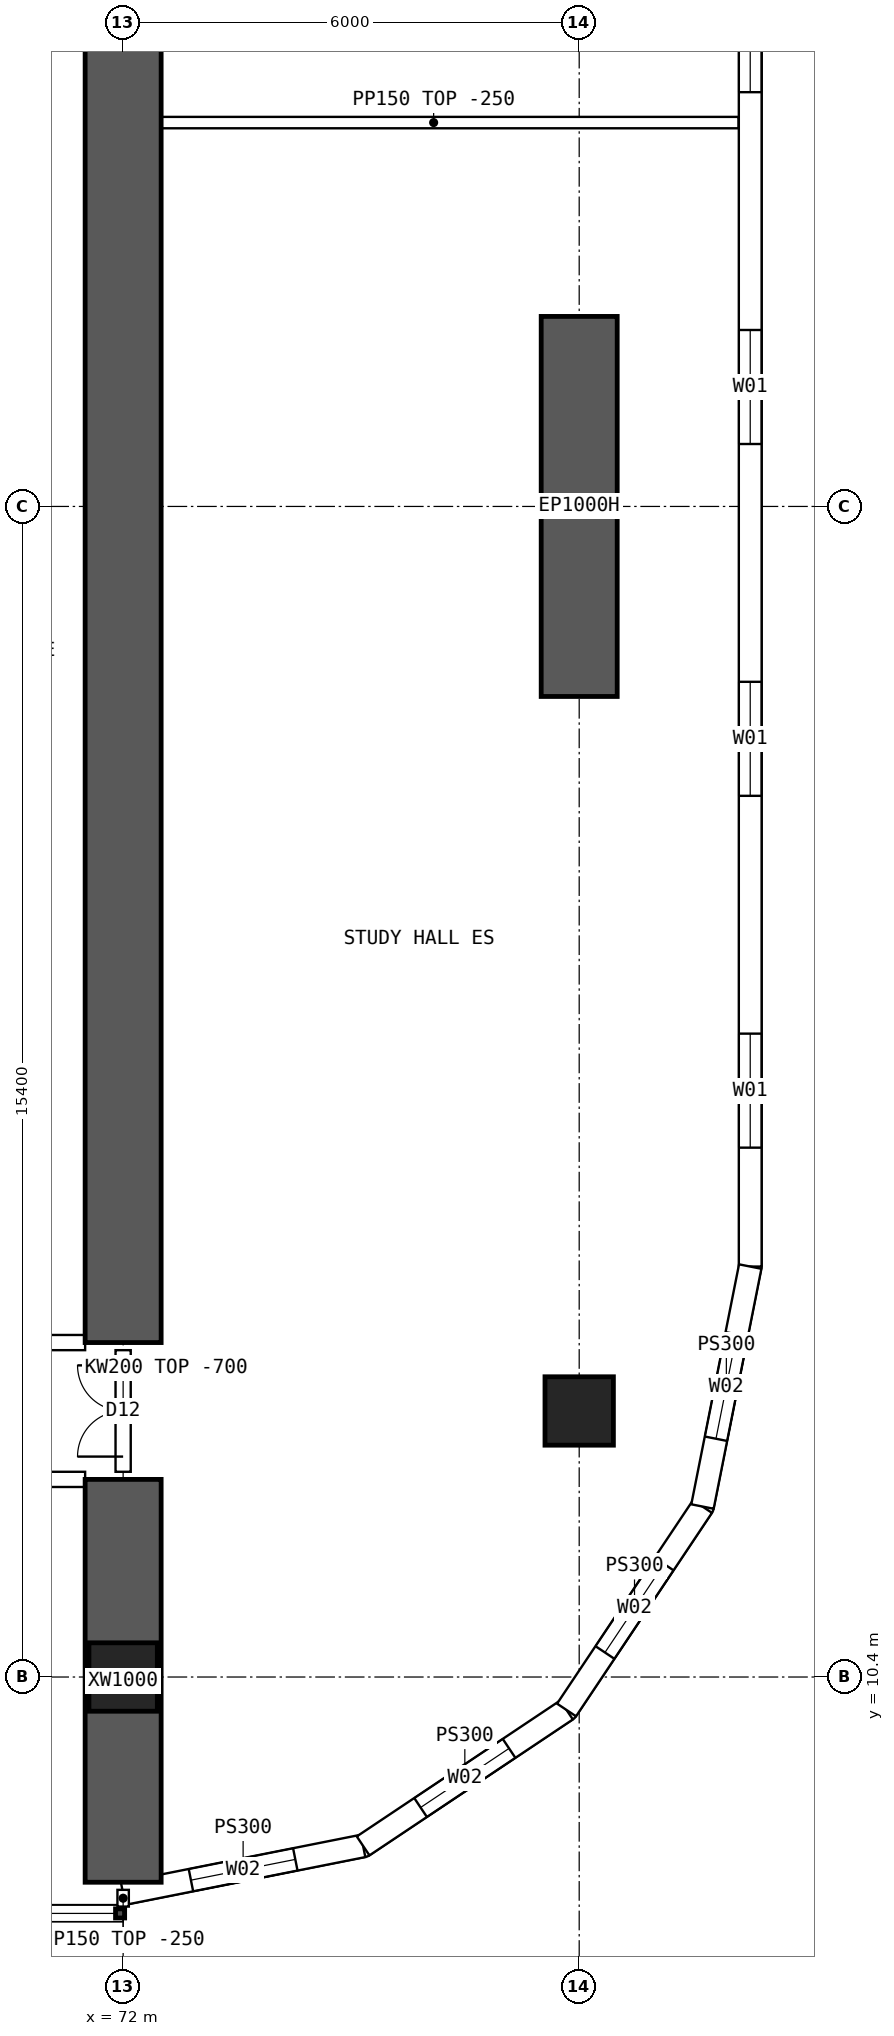
"""IFC4 building model, lengths in metres.
Left out: names, types, materials, properties, quantities, classifications, styles, units other than length and angle.
Written with IfcOpenShell. Run it as: python <this file> out.ifc"""

import sys

from ifc_helpers import new_model, si_unit, direction, frame, frame_2d, origin, origin_2d, place, context, subcontext, project, spatial, polyline, rectangle, hollow_rectangle, outline, extrude, element, fill, save


model = new_model("IFC4")
c1 = context("Model", 3, precision=1e-05, world=origin(), true_north=direction((0.0, 1.0)))
c2 = subcontext(c1, "Body", "Model", "MODEL_VIEW")
j1 = project(units=[si_unit("LENGTHUNIT", "METRE"), si_unit("PLANEANGLEUNIT", "RADIAN")], contexts=[c1])
p1 = place(None, origin())
s1 = spatial("IfcSite", under=j1, at=p1, CompositionType="ELEMENT")
p2 = place(p1, origin())
s2 = spatial("IfcBuilding", under=s1, at=p2, CompositionType="ELEMENT")
p3 = place(p2, frame((0.0, 0.0, 57.7)))
s3 = spatial("IfcBuildingStorey", under=s2, at=p3, CompositionType="ELEMENT", Elevation=57.7)
for number, where, z_axis, x_axis in (
    (1, (72.0, 10.4, 0.0), (0.0, 0.0, 1.0), (1.0, 0.0, 0.0)),
    (2, (78.0, 13.9, 0.0), (0.0, 0.0, 1.0), (1.0, 0.0, 0.0)),
):
    element("IfcColumn", number, at=place(p3, frame(where, z_axis=z_axis, x_axis=x_axis)), inside=s3, PredefinedType="COLUMN", context=c2, shape_type="SweptSolid", body=[
        extrude(hollow_rectangle(XDim=0.9, YDim=0.9, WallThickness=0.09, at=origin_2d()), origin(), (0.0, 0.0, 1.0), 3.75),
    ])
p4 = place(p3, frame((78.0, 23.3, 0.0), z_axis=(0.0, 0.0, 1.0), x_axis=(0.0, 1.0, 0.0)))
e3 = element("IfcWall", 3, at=p4, inside=s3, PredefinedType="SHEAR", context=c2, shape_type="SweptSolid", body=[
    extrude(rectangle(XDim=5.0, YDim=1.0, at=frame_2d((2.5, 0.0))), origin(), (0.0, 0.0, 1.0), 3.75),
])
p5 = place(p3, frame((72.0, 7.7, 0.0), z_axis=(0.0, 0.0, 1.0), x_axis=(0.0, 1.0, 0.0)))
e4 = element("IfcWall", 4, at=p5, inside=s3, PredefinedType="SHEAR", context=c2, shape_type="SweptSolid", body=[
    extrude(rectangle(XDim=5.3, YDim=1.0, at=frame_2d((2.65, 0.0))), origin(), (0.0, 0.0, 1.0), 3.75),
])
p6 = place(p3, frame((72.0, 14.8, 0.0), z_axis=(0.0, 0.0, 1.0), x_axis=(0.0, 1.0, 0.0)))
e5 = element("IfcWall", 5, at=p6, inside=s3, PredefinedType="SHEAR", context=c2, shape_type="SweptSolid", body=[
    extrude(rectangle(XDim=34.4, YDim=1.0, at=frame_2d((17.2, 0.0))), origin(), (0.0, 0.0, 1.0), 3.75),
])
p7 = place(p3, frame((80.25, 15.8, 0.0), z_axis=(0.0, 0.0, 1.0), x_axis=(0.0, 1.0, 0.0)))
e6 = element("IfcWall", 6, at=p7, inside=s3, PredefinedType="SOLIDWALL", context=c2, shape_type="SweptSolid", body=[
    extrude(outline(polyline([(-0.015, -0.15), (32.415, -0.15), (32.385, 0.15), (0.015, 0.15), (-0.015, -0.15)])), origin(), (0.0, 0.0, 1.0), 3.5),
])
p8 = place(p7, frame((1.564, 0.0, 0.9)))
e7 = element("IfcOpeningElement", 7, at=p8, cuts=e6, PredefinedType="OPENING", context=c2, shape_type="SweptSolid", body=[
    extrude(rectangle(XDim=1.5, YDim=2.0, at=frame_2d((0.75, 1.0))), frame((0.0, 0.16, 0.0), z_axis=(0.0, -1.0, 0.0), x_axis=(1.0, 0.0, 0.0)), (0.0, 0.0, 1.0), 0.32),
])
p9 = place(p7, frame((6.193, 0.0, 0.9)))
e8 = element("IfcOpeningElement", 8, at=p9, cuts=e6, PredefinedType="OPENING", context=c2, shape_type="SweptSolid", body=[
    extrude(rectangle(XDim=1.5, YDim=2.0, at=frame_2d((0.75, 1.0))), frame((0.0, 0.16, 0.0), z_axis=(0.0, -1.0, 0.0), x_axis=(1.0, 0.0, 0.0)), (0.0, 0.0, 1.0), 0.32),
])
p10 = place(p7, frame((10.822, 0.0, 0.9)))
e9 = element("IfcOpeningElement", 9, at=p10, cuts=e6, PredefinedType="OPENING", context=c2, shape_type="SweptSolid", body=[
    extrude(rectangle(XDim=1.5, YDim=2.0, at=frame_2d((0.75, 1.0))), frame((0.0, 0.16, 0.0), z_axis=(0.0, -1.0, 0.0), x_axis=(1.0, 0.0, 0.0)), (0.0, 0.0, 1.0), 0.32),
])
p11 = place(p7, frame((15.45, 0.0, 0.9)))
e10 = element("IfcOpeningElement", 10, at=p11, cuts=e6, PredefinedType="OPENING", context=c2, shape_type="SweptSolid", body=[
    extrude(rectangle(XDim=1.5, YDim=2.0, at=frame_2d((0.75, 1.0))), frame((0.0, 0.16, 0.0), z_axis=(0.0, -1.0, 0.0), x_axis=(1.0, 0.0, 0.0)), (0.0, 0.0, 1.0), 0.32),
])
p12 = place(p7, frame((20.079, 0.0, 0.9)))
e11 = element("IfcOpeningElement", 11, at=p12, cuts=e6, PredefinedType="OPENING", context=c2, shape_type="SweptSolid", body=[
    extrude(rectangle(XDim=1.5, YDim=2.0, at=frame_2d((0.75, 1.0))), frame((0.0, 0.16, 0.0), z_axis=(0.0, -1.0, 0.0), x_axis=(1.0, 0.0, 0.0)), (0.0, 0.0, 1.0), 0.32),
])
p13 = place(p7, frame((24.707, 0.0, 0.9)))
e12 = element("IfcOpeningElement", 12, at=p13, cuts=e6, PredefinedType="OPENING", context=c2, shape_type="SweptSolid", body=[
    extrude(rectangle(XDim=1.5, YDim=2.0, at=frame_2d((0.75, 1.0))), frame((0.0, 0.16, 0.0), z_axis=(0.0, -1.0, 0.0), x_axis=(1.0, 0.0, 0.0)), (0.0, 0.0, 1.0), 0.32),
])
p14 = place(p7, frame((29.336, 0.0, 0.9)))
e13 = element("IfcOpeningElement", 13, at=p14, cuts=e6, PredefinedType="OPENING", context=c2, shape_type="SweptSolid", body=[
    extrude(rectangle(XDim=1.5, YDim=2.0, at=frame_2d((0.75, 1.0))), frame((0.0, 0.16, 0.0), z_axis=(0.0, -1.0, 0.0), x_axis=(1.0, 0.0, 0.0)), (0.0, 0.0, 1.0), 0.32),
])
p15 = place(p3, frame((72.0, 7.55, 0.0), z_axis=(0.0, 0.0, 1.0), x_axis=(0.980787251524, 0.195080412259, 0.0)))
e14 = element("IfcWall", 14, at=p15, inside=s3, PredefinedType="SOLIDWALL", context=c2, shape_type="SweptSolid", body=[
    extrude(outline(polyline([(-0.03, -0.15), (3.249, -0.15), (3.189, 0.15), (0.03, 0.15), (-0.03, -0.15)])), origin(), (0.0, 0.0, 1.0), 3.5),
])
p16 = place(p15, frame((0.909, 0.0, 0.9)))
e15 = element("IfcOpeningElement", 15, at=p16, cuts=e14, PredefinedType="OPENING", context=c2, shape_type="SweptSolid", body=[
    extrude(rectangle(XDim=1.4, YDim=1.8, at=frame_2d((0.7, 0.9))), frame((0.0, 0.16, 0.0), z_axis=(0.0, -1.0, 0.0), x_axis=(1.0, 0.0, 0.0)), (0.0, 0.0, 1.0), 0.32),
])
p17 = place(p3, frame((75.157, 8.178, 0.0), z_axis=(0.0, 0.0, 1.0), x_axis=(0.831478105043, 0.555557522525, 0.0)))
e16 = element("IfcWall", 16, at=p17, inside=s3, PredefinedType="SOLIDWALL", context=c2, shape_type="SweptSolid", body=[
    extrude(outline(polyline([(-0.03, -0.15), (3.249, -0.15), (3.189, 0.15), (0.03, 0.15), (-0.03, -0.15)])), origin(), (0.0, 0.0, 1.0), 3.5),
])
p18 = place(p17, frame((0.909, 0.0, 0.9)))
e17 = element("IfcOpeningElement", 17, at=p18, cuts=e16, PredefinedType="OPENING", context=c2, shape_type="SweptSolid", body=[
    extrude(rectangle(XDim=1.4, YDim=1.8, at=frame_2d((0.7, 0.9))), frame((0.0, 0.16, 0.0), z_axis=(0.0, -1.0, 0.0), x_axis=(1.0, 0.0, 0.0)), (0.0, 0.0, 1.0), 0.32),
])
p19 = place(p3, frame((77.833, 9.966, 0.0), z_axis=(0.0, 0.0, 1.0), x_axis=(0.555609954424, 0.831443069936, 0.0)))
e18 = element("IfcWall", 18, at=p19, inside=s3, PredefinedType="SOLIDWALL", context=c2, shape_type="SweptSolid", body=[
    extrude(outline(polyline([(-0.03, -0.15), (3.249, -0.15), (3.189, 0.15), (0.03, 0.15), (-0.03, -0.15)])), origin(), (0.0, 0.0, 1.0), 3.5),
])
p20 = place(p19, frame((0.909, 0.0, 0.9)))
e19 = element("IfcOpeningElement", 19, at=p20, cuts=e18, PredefinedType="OPENING", context=c2, shape_type="SweptSolid", body=[
    extrude(rectangle(XDim=1.4, YDim=1.8, at=frame_2d((0.7, 0.9))), frame((0.0, 0.16, 0.0), z_axis=(0.0, -1.0, 0.0), x_axis=(1.0, 0.0, 0.0)), (0.0, 0.0, 1.0), 0.32),
])
p21 = place(p3, frame((79.622, 12.643, 0.0), z_axis=(0.0, 0.0, 1.0), x_axis=(0.195065901187, 0.980790137692, 0.0)))
e20 = element("IfcWall", 20, at=p21, inside=s3, PredefinedType="SOLIDWALL", context=c2, shape_type="SweptSolid", body=[
    extrude(outline(polyline([(-0.03, -0.15), (3.234, -0.15), (3.204, 0.15), (0.03, 0.15), (-0.03, -0.15)])), origin(), (0.0, 0.0, 1.0), 3.5),
])
p22 = place(p21, frame((0.909, 0.0, 0.9)))
e21 = element("IfcOpeningElement", 21, at=p22, cuts=e20, PredefinedType="OPENING", context=c2, shape_type="SweptSolid", body=[
    extrude(rectangle(XDim=1.4, YDim=1.8, at=frame_2d((0.7, 0.9))), frame((0.0, 0.16, 0.0), z_axis=(0.0, -1.0, 0.0), x_axis=(1.0, 0.0, 0.0)), (0.0, 0.0, 1.0), 0.32),
])
p23 = place(p3, frame((66.5, 13.0, 0.0), z_axis=(0.0, 0.0, 1.0), x_axis=(1.0, 0.0, 0.0)))
e22 = element("IfcWall", 22, at=p23, inside=s3, PredefinedType="SOLIDWALL", context=c2, shape_type="SweptSolid", body=[
    extrude(outline(polyline([(0.0, 0.0), (5.0, 0.0), (5.0, 3.1), (0.0, 3.1), (0.0, 0.0)])), frame((0.0, 0.1, 0.0), z_axis=(0.0, -1.0, 0.0), x_axis=(1.0, 0.0, 0.0)), (0.0, 0.0, 1.0), 0.2),
])
p24 = place(p23, frame((0.6, 0.0, 0.0)))
e23 = element("IfcOpeningElement", 23, at=p24, cuts=e22, PredefinedType="OPENING", context=c2, shape_type="SweptSolid", body=[
    extrude(rectangle(XDim=1.0, YDim=2.1, at=frame_2d((0.5, 1.05))), frame((0.0, 0.11, 0.0), z_axis=(0.0, -1.0, 0.0), x_axis=(1.0, 0.0, 0.0)), (0.0, 0.0, 1.0), 0.22),
])
p25 = place(p3, frame((66.5, 14.8, 0.0), z_axis=(0.0, 0.0, 1.0), x_axis=(1.0, 0.0, 0.0)))
e24 = element("IfcWall", 24, at=p25, inside=s3, PredefinedType="SOLIDWALL", context=c2, shape_type="SweptSolid", body=[
    extrude(rectangle(XDim=5.0, YDim=0.2, at=frame_2d((2.5, 0.0))), origin(), (0.0, 0.0, 1.0), 3.5),
])
p26 = place(p25, frame((0.2, 0.0, 0.0)))
e25 = element("IfcOpeningElement", 25, at=p26, cuts=e24, PredefinedType="OPENING", context=c2, shape_type="SweptSolid", body=[
    extrude(rectangle(XDim=1.6, YDim=2.1, at=frame_2d((0.8, 1.05))), frame((0.0, 0.11, 0.0), z_axis=(0.0, -1.0, 0.0), x_axis=(1.0, 0.0, 0.0)), (0.0, 0.0, 1.0), 0.22),
])
p27 = place(p3, frame((72.075, 30.85, 0.0), z_axis=(0.0, 0.0, 1.0), x_axis=(1.0, 0.0, 0.0)))
e26 = element("IfcWall", 26, at=p27, inside=s3, PredefinedType="PARTITIONING", context=c2, shape_type="SweptSolid", body=[
    extrude(outline(polyline([(0.0, 0.0), (8.02, 0.0), (8.02, 3.5), (6.227, 3.5), (6.225, 3.05), (5.627, 3.05), (5.625, 3.5), (0.0, 3.5), (0.0, 0.0)])), frame((0.0, 0.075, 0.0), z_axis=(0.0, -1.0, 0.0), x_axis=(1.0, 0.0, 0.0)), (0.0, 0.0, 1.0), 0.15),
])
p28 = place(p3, frame((72.0, 13.1, 0.0), z_axis=(0.0, 0.0, 1.0), x_axis=(0.0, 1.0, 0.0)))
e27 = element("IfcWall", 27, at=p28, inside=s3, PredefinedType="SOLIDWALL", context=c2, shape_type="SweptSolid", body=[
    extrude(outline(polyline([(0.0, 0.0), (1.6, 0.0), (1.6, 3.05), (0.0, 3.05), (0.0, 0.0)])), frame((0.0, 0.1, 0.0), z_axis=(0.0, -1.0, 0.0), x_axis=(1.0, 0.0, 0.0)), (0.0, 0.0, 1.0), 0.2),
])
p29 = place(p28, frame((0.2, 0.0, 0.0)))
e28 = element("IfcOpeningElement", 28, at=p29, cuts=e27, PredefinedType="OPENING", context=c2, shape_type="SweptSolid", body=[
    extrude(rectangle(XDim=1.2, YDim=2.1, at=frame_2d((0.6, 1.05))), frame((0.0, 0.11, 0.0), z_axis=(0.0, -1.0, 0.0), x_axis=(1.0, 0.0, 0.0)), (0.0, 0.0, 1.0), 0.22),
])
p30 = place(p3, frame((72.0, 7.6, 0.0), z_axis=(0.0, 0.0, 1.0), x_axis=(0.0, -1.0, 0.0)))
e29 = element("IfcWall", 29, at=p30, inside=s3, PredefinedType="PARTITIONING", context=c2, shape_type="SweptSolid", body=[
    extrude(rectangle(XDim=0.22, YDim=0.15, at=frame_2d((0.11, 0.0))), origin(), (0.0, 0.0, 1.0), 3.5),
])
p31 = place(p8, origin())
e30 = element("IfcWindow", 30, at=p31, inside=s3, PartitioningType="SINGLE_PANEL", PredefinedType="WINDOW", context=c2, shape_type="SweptSolid", body=[
    extrude(rectangle(XDim=1.5, YDim=2.0, at=frame_2d((0.75, 1.0))), frame((0.0, 0.03, 0.0), z_axis=(0.0, -1.0, 0.0), x_axis=(1.0, 0.0, 0.0)), (0.0, 0.0, 1.0), 0.06),
])
fill(e7, e30)
p32 = place(p9, origin())
e31 = element("IfcWindow", 31, at=p32, inside=s3, PartitioningType="SINGLE_PANEL", PredefinedType="WINDOW", context=c2, shape_type="SweptSolid", body=[
    extrude(rectangle(XDim=1.5, YDim=2.0, at=frame_2d((0.75, 1.0))), frame((0.0, 0.03, 0.0), z_axis=(0.0, -1.0, 0.0), x_axis=(1.0, 0.0, 0.0)), (0.0, 0.0, 1.0), 0.06),
])
fill(e8, e31)
p33 = place(p10, origin())
e32 = element("IfcWindow", 32, at=p33, inside=s3, PartitioningType="SINGLE_PANEL", PredefinedType="WINDOW", context=c2, shape_type="SweptSolid", body=[
    extrude(rectangle(XDim=1.5, YDim=2.0, at=frame_2d((0.75, 1.0))), frame((0.0, 0.03, 0.0), z_axis=(0.0, -1.0, 0.0), x_axis=(1.0, 0.0, 0.0)), (0.0, 0.0, 1.0), 0.06),
])
fill(e9, e32)
p34 = place(p11, origin())
e33 = element("IfcWindow", 33, at=p34, inside=s3, PartitioningType="SINGLE_PANEL", PredefinedType="WINDOW", context=c2, shape_type="SweptSolid", body=[
    extrude(rectangle(XDim=1.5, YDim=2.0, at=frame_2d((0.75, 1.0))), frame((0.0, 0.03, 0.0), z_axis=(0.0, -1.0, 0.0), x_axis=(1.0, 0.0, 0.0)), (0.0, 0.0, 1.0), 0.06),
])
fill(e10, e33)
p35 = place(p16, origin())
e34 = element("IfcWindow", 34, at=p35, inside=s3, PartitioningType="SINGLE_PANEL", PredefinedType="WINDOW", context=c2, shape_type="SweptSolid", body=[
    extrude(rectangle(XDim=1.4, YDim=1.8, at=frame_2d((0.7, 0.9))), frame((0.0, 0.03, 0.0), z_axis=(0.0, -1.0, 0.0), x_axis=(1.0, 0.0, 0.0)), (0.0, 0.0, 1.0), 0.06),
])
fill(e15, e34)
p36 = place(p18, origin())
e35 = element("IfcWindow", 35, at=p36, inside=s3, PartitioningType="SINGLE_PANEL", PredefinedType="WINDOW", context=c2, shape_type="SweptSolid", body=[
    extrude(rectangle(XDim=1.4, YDim=1.8, at=frame_2d((0.7, 0.9))), frame((0.0, 0.03, 0.0), z_axis=(0.0, -1.0, 0.0), x_axis=(1.0, 0.0, 0.0)), (0.0, 0.0, 1.0), 0.06),
])
fill(e17, e35)
p37 = place(p20, origin())
e36 = element("IfcWindow", 36, at=p37, inside=s3, PartitioningType="SINGLE_PANEL", PredefinedType="WINDOW", context=c2, shape_type="SweptSolid", body=[
    extrude(rectangle(XDim=1.4, YDim=1.8, at=frame_2d((0.7, 0.9))), frame((0.0, 0.03, 0.0), z_axis=(0.0, -1.0, 0.0), x_axis=(1.0, 0.0, 0.0)), (0.0, 0.0, 1.0), 0.06),
])
fill(e19, e36)
p38 = place(p22, origin())
e37 = element("IfcWindow", 37, at=p38, inside=s3, PartitioningType="SINGLE_PANEL", PredefinedType="WINDOW", context=c2, shape_type="SweptSolid", body=[
    extrude(rectangle(XDim=1.4, YDim=1.8, at=frame_2d((0.7, 0.9))), frame((0.0, 0.03, 0.0), z_axis=(0.0, -1.0, 0.0), x_axis=(1.0, 0.0, 0.0)), (0.0, 0.0, 1.0), 0.06),
])
fill(e21, e37)
p39 = place(p29, origin())
e38 = element("IfcDoor", 38, at=p39, inside=s3, OperationType="DOUBLE_DOOR_SINGLE_SWING", PredefinedType="DOOR", context=c2, shape_type="SweptSolid", body=[
    extrude(rectangle(XDim=1.2, YDim=2.1, at=frame_2d((0.6, 1.05))), frame((0.0, 0.025, 0.0), z_axis=(0.0, -1.0, 0.0), x_axis=(1.0, 0.0, 0.0)), (0.0, 0.0, 1.0), 0.05),
])
fill(e28, e38)
save(model, sys.argv[1])
